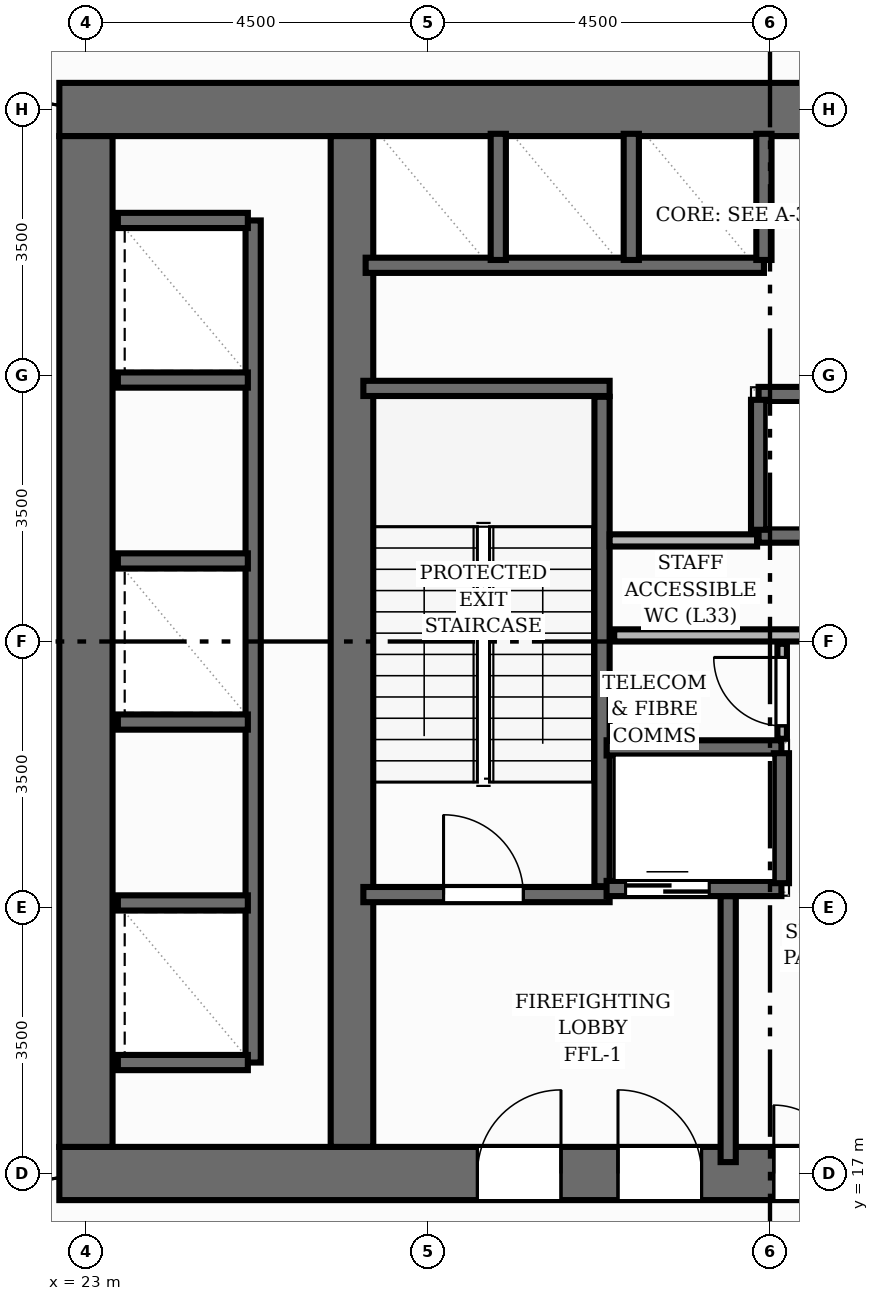
"""IFC4 building model, lengths in metres.
Left out: names, types, materials, properties, quantities, classifications, styles, units other than length and angle.
Written with IfcOpenShell. Run it as: python <this file> out.ifc"""

import sys

from ifc_helpers import new_model, si_unit, direction, frame, frame_2d, origin, place, context, subcontext, project, spatial, rectangle, extrude, element, fill, save


model = new_model("IFC4")
c1 = context("Model", 3, precision=1e-05, world=origin(), true_north=direction((0.0, 1.0)))
c2 = subcontext(c1, "Body", "Model", "MODEL_VIEW")
j1 = project(units=[si_unit("LENGTHUNIT", "METRE"), si_unit("PLANEANGLEUNIT", "RADIAN")], contexts=[c1])
p1 = place(None, origin())
s1 = spatial("IfcSite", under=j1, at=p1, CompositionType="ELEMENT")
p2 = place(p1, origin())
s2 = spatial("IfcBuilding", under=s1, at=p2, CompositionType="ELEMENT")
p3 = place(p2, frame((0.0, 0.0, 112.48)))
s3 = spatial("IfcBuildingStorey", under=s2, at=p3, CompositionType="ELEMENT", Elevation=112.48)
p4 = place(p3, frame((22.65, 17.0, 0.0), z_axis=(0.0, 0.0, 1.0), x_axis=(1.0, 0.0, 0.0)))
e1 = element("IfcWall", 1, at=p4, inside=s3, PredefinedType="SHEAR", context=c2, shape_type="SweptSolid", body=[
    extrude(rectangle(XDim=18.7, YDim=0.7, at=frame_2d((9.35, 0.0))), origin(), (0.0, 0.0, 1.0), 4.48),
])
p5 = place(p4, frame((5.5, 0.0, 0.0)))
e2 = element("IfcOpeningElement", 2, at=p5, cuts=e1, PredefinedType="OPENING", context=c2, shape_type="SweptSolid", body=[
    extrude(rectangle(XDim=1.1, YDim=2.15, at=frame_2d((0.55, 1.075))), frame((0.0, 0.36, 0.0), z_axis=(0.0, -1.0, 0.0), x_axis=(1.0, 0.0, 0.0)), (0.0, 0.0, 1.0), 0.72),
])
p6 = place(p4, frame((7.35, 0.0, 0.0)))
e3 = element("IfcOpeningElement", 3, at=p6, cuts=e1, PredefinedType="OPENING", context=c2, shape_type="SweptSolid", body=[
    extrude(rectangle(XDim=1.1, YDim=2.15, at=frame_2d((0.55, 1.075))), frame((0.0, 0.36, 0.0), z_axis=(0.0, -1.0, 0.0), x_axis=(1.0, 0.0, 0.0)), (0.0, 0.0, 1.0), 0.72),
])
p7 = place(p4, frame((9.4, 0.0, 0.0)))
e4 = element("IfcOpeningElement", 4, at=p7, cuts=e1, PredefinedType="OPENING", context=c2, shape_type="SweptSolid", body=[
    extrude(rectangle(XDim=0.9, YDim=2.1, at=frame_2d((0.45, 1.05))), frame((0.0, 0.36, 0.0), z_axis=(0.0, -1.0, 0.0), x_axis=(1.0, 0.0, 0.0)), (0.0, 0.0, 1.0), 0.72),
])
p8 = place(p3, frame((22.65, 31.0, 0.0), z_axis=(0.0, 0.0, 1.0), x_axis=(1.0, 0.0, 0.0)))
e5 = element("IfcWall", 5, at=p8, inside=s3, PredefinedType="SHEAR", context=c2, shape_type="SweptSolid", body=[
    extrude(rectangle(XDim=18.7, YDim=0.7, at=frame_2d((9.35, 0.0))), origin(), (0.0, 0.0, 1.0), 4.48),
])
p9 = place(p8, frame((10.25, 0.0, 0.0)))
e6 = element("IfcOpeningElement", 6, at=p9, cuts=e5, PredefinedType="OPENING", context=c2, shape_type="SweptSolid", body=[
    extrude(rectangle(XDim=1.1, YDim=2.15, at=frame_2d((0.55, 1.075))), frame((0.0, 0.36, 0.0), z_axis=(0.0, -1.0, 0.0), x_axis=(1.0, 0.0, 0.0)), (0.0, 0.0, 1.0), 0.72),
])
p10 = place(p8, frame((12.1, 0.0, 0.0)))
e7 = element("IfcOpeningElement", 7, at=p10, cuts=e5, PredefinedType="OPENING", context=c2, shape_type="SweptSolid", body=[
    extrude(rectangle(XDim=1.1, YDim=2.15, at=frame_2d((0.55, 1.075))), frame((0.0, 0.36, 0.0), z_axis=(0.0, -1.0, 0.0), x_axis=(1.0, 0.0, 0.0)), (0.0, 0.0, 1.0), 0.72),
])
p11 = place(p3, frame((23.0, 17.35, 0.0), z_axis=(0.0, 0.0, 1.0), x_axis=(0.0, 1.0, 0.0)))
e8 = element("IfcWall", 8, at=p11, inside=s3, PredefinedType="SHEAR", context=c2, shape_type="SweptSolid", body=[
    extrude(rectangle(XDim=13.3, YDim=0.7, at=frame_2d((6.65, 0.0))), origin(), (0.0, 0.0, 1.0), 4.48),
])
p12 = place(p3, frame((26.5, 17.35, 0.0), z_axis=(0.0, 0.0, 1.0), x_axis=(0.0, 1.0, 0.0)))
e9 = element("IfcWall", 9, at=p12, inside=s3, PredefinedType="SHEAR", context=c2, shape_type="SweptSolid", body=[
    extrude(rectangle(XDim=13.3, YDim=0.56, at=frame_2d((6.65, 0.0))), origin(), (0.0, 0.0, 1.0), 4.48),
])
p13 = place(p3, frame((29.79, 20.78, 0.0), z_axis=(0.0, 0.0, 1.0), x_axis=(0.0, 1.0, 0.0)))
e10 = element("IfcWall", 10, at=p13, inside=s3, PredefinedType="SHEAR", context=c2, shape_type="SweptSolid", body=[
    extrude(rectangle(XDim=6.44, YDim=0.2, at=frame_2d((3.22, 0.0))), origin(), (0.0, 0.0, 1.0), 4.48),
])
p14 = place(p3, frame((26.65, 27.33, 0.0), z_axis=(0.0, 0.0, 1.0), x_axis=(1.0, 0.0, 0.0)))
e11 = element("IfcWall", 11, at=p14, inside=s3, PredefinedType="SHEAR", context=c2, shape_type="SweptSolid", body=[
    extrude(rectangle(XDim=3.24, YDim=0.2, at=frame_2d((1.62, 0.0))), origin(), (0.0, 0.0, 1.0), 4.48),
])
p15 = place(p3, frame((26.65, 20.67, 0.0), z_axis=(0.0, 0.0, 1.0), x_axis=(1.0, 0.0, 0.0)))
e12 = element("IfcWall", 12, at=p15, inside=s3, PredefinedType="SHEAR", context=c2, shape_type="SweptSolid", body=[
    extrude(rectangle(XDim=3.24, YDim=0.2, at=frame_2d((1.62, 0.0))), origin(), (0.0, 0.0, 1.0), 4.48),
])
p16 = place(p15, frame((1.055, 0.0, 0.0)))
e13 = element("IfcOpeningElement", 13, at=p16, cuts=e12, PredefinedType="OPENING", context=c2, shape_type="SweptSolid", body=[
    extrude(rectangle(XDim=1.05, YDim=2.15, at=frame_2d((0.525, 1.075))), frame((0.0, 0.11, 0.0), z_axis=(0.0, -1.0, 0.0), x_axis=(1.0, 0.0, 0.0)), (0.0, 0.0, 1.0), 0.22),
])
p17 = place(p3, frame((31.45, 17.15, 0.0), z_axis=(0.0, 0.0, 1.0), x_axis=(0.0, 1.0, 0.0)))
e14 = element("IfcWall", 14, at=p17, inside=s3, PredefinedType="SHEAR", context=c2, shape_type="SweptSolid", body=[
    extrude(rectangle(XDim=3.5, YDim=0.2, at=frame_2d((1.75, 0.0))), origin(), (0.0, 0.0, 1.0), 4.48),
])
p18 = place(p3, frame((29.85, 20.75, 0.0), z_axis=(0.0, 0.0, 1.0), x_axis=(1.0, 0.0, 0.0)))
e15 = element("IfcWall", 15, at=p18, inside=s3, PredefinedType="SHEAR", context=c2, shape_type="SweptSolid", body=[
    extrude(rectangle(XDim=2.3, YDim=0.2, at=frame_2d((1.15, 0.0))), origin(), (0.0, 0.0, 1.0), 4.48),
])
p19 = place(p18, frame((0.25, 0.0, 0.0)))
e16 = element("IfcOpeningElement", 16, at=p19, cuts=e15, PredefinedType="OPENING", context=c2, shape_type="SweptSolid", body=[
    extrude(rectangle(XDim=1.1, YDim=2.15, at=frame_2d((0.55, 1.075))), frame((0.0, 0.11, 0.0), z_axis=(0.0, -1.0, 0.0), x_axis=(1.0, 0.0, 0.0)), (0.0, 0.0, 1.0), 0.22),
])
p20 = place(p3, frame((29.85, 22.6, 0.0), z_axis=(0.0, 0.0, 1.0), x_axis=(1.0, 0.0, 0.0)))
e17 = element("IfcWall", 17, at=p20, inside=s3, PredefinedType="SHEAR", context=c2, shape_type="SweptSolid", body=[
    extrude(rectangle(XDim=2.3, YDim=0.2, at=frame_2d((1.15, 0.0))), origin(), (0.0, 0.0, 1.0), 4.48),
])
p21 = place(p3, frame((32.15, 20.82, 0.0), z_axis=(0.0, 0.0, 1.0), x_axis=(0.0, 1.0, 0.0)))
e18 = element("IfcWall", 18, at=p21, inside=s3, PredefinedType="SHEAR", context=c2, shape_type="SweptSolid", body=[
    extrude(rectangle(XDim=1.71, YDim=0.2, at=frame_2d((0.855, 0.0))), origin(), (0.0, 0.0, 1.0), 4.48),
])
p22 = place(p3, frame((31.85, 27.25, 0.0), z_axis=(0.0, 0.0, 1.0), x_axis=(1.0, 0.0, 0.0)))
e19 = element("IfcWall", 19, at=p22, inside=s3, PredefinedType="SHEAR", context=c2, shape_type="SweptSolid", body=[
    extrude(rectangle(XDim=2.3, YDim=0.2, at=frame_2d((1.15, 0.0))), origin(), (0.0, 0.0, 1.0), 4.48),
])
p23 = place(p22, frame((0.95, 0.0, 0.0)))
e20 = element("IfcOpeningElement", 20, at=p23, cuts=e19, PredefinedType="OPENING", context=c2, shape_type="SweptSolid", body=[
    extrude(rectangle(XDim=1.1, YDim=2.15, at=frame_2d((0.55, 1.075))), frame((0.0, 0.11, 0.0), z_axis=(0.0, -1.0, 0.0), x_axis=(1.0, 0.0, 0.0)), (0.0, 0.0, 1.0), 0.22),
])
p24 = place(p3, frame((31.85, 25.4, 0.0), z_axis=(0.0, 0.0, 1.0), x_axis=(1.0, 0.0, 0.0)))
e21 = element("IfcWall", 21, at=p24, inside=s3, PredefinedType="SHEAR", context=c2, shape_type="SweptSolid", body=[
    extrude(rectangle(XDim=2.3, YDim=0.2, at=frame_2d((1.15, 0.0))), origin(), (0.0, 0.0, 1.0), 4.48),
])
p25 = place(p3, frame((31.85, 25.47, 0.0), z_axis=(0.0, 0.0, 1.0), x_axis=(0.0, 1.0, 0.0)))
e22 = element("IfcWall", 22, at=p25, inside=s3, PredefinedType="SHEAR", context=c2, shape_type="SweptSolid", body=[
    extrude(rectangle(XDim=1.71, YDim=0.2, at=frame_2d((0.855, 0.0))), origin(), (0.0, 0.0, 1.0), 4.48),
])
p26 = place(p3, frame((25.2, 18.46, 0.0), z_axis=(0.0, 0.0, 1.0), x_axis=(0.0, 1.0, 0.0)))
e23 = element("IfcWall", 23, at=p26, inside=s3, PredefinedType="SHEAR", context=c2, shape_type="SweptSolid", body=[
    extrude(rectangle(XDim=11.08, YDim=0.2, at=frame_2d((5.54, 0.0))), origin(), (0.0, 0.0, 1.0), 4.48),
])
for number, where, z_axis, x_axis in (
    (24, (23.42, 18.46, 0.0), (0.0, 0.0, 1.0), (1.0, 0.0, 0.0)),
    (25, (23.42, 29.54, 0.0), (0.0, 0.0, 1.0), (1.0, 0.0, 0.0)),
    (26, (23.42, 20.56, 0.0), (0.0, 0.0, 1.0), (1.0, 0.0, 0.0)),
    (27, (23.42, 22.94, 0.0), (0.0, 0.0, 1.0), (1.0, 0.0, 0.0)),
    (28, (23.42, 25.06, 0.0), (0.0, 0.0, 1.0), (1.0, 0.0, 0.0)),
    (29, (23.42, 27.44, 0.0), (0.0, 0.0, 1.0), (1.0, 0.0, 0.0)),
):
    element("IfcWall", number, at=place(p3, frame(where, z_axis=z_axis, x_axis=x_axis)), inside=s3, PredefinedType="SHEAR", context=c2, shape_type="SweptSolid", body=[
        extrude(rectangle(XDim=1.71, YDim=0.2, at=frame_2d((0.855, 0.0))), origin(), (0.0, 0.0, 1.0), 4.48),
    ])
p27 = place(p3, frame((26.68, 28.95, 0.0), z_axis=(0.0, 0.0, 1.0), x_axis=(1.0, 0.0, 0.0)))
e30 = element("IfcWall", 30, at=p27, inside=s3, PredefinedType="SHEAR", context=c2, shape_type="SweptSolid", body=[
    extrude(rectangle(XDim=5.24, YDim=0.2, at=frame_2d((2.62, 0.0))), origin(), (0.0, 0.0, 1.0), 4.48),
])
for number, where, z_axis, x_axis in (
    (31, (31.92, 29.02, 0.0), (0.0, 0.0, 1.0), (0.0, 1.0, 0.0)),
    (32, (28.425, 29.02, 0.0), (0.0, 0.0, 1.0), (0.0, 1.0, 0.0)),
    (33, (30.175, 29.02, 0.0), (0.0, 0.0, 1.0), (0.0, 1.0, 0.0)),
):
    element("IfcWall", number, at=place(p3, frame(where, z_axis=z_axis, x_axis=x_axis)), inside=s3, PredefinedType="SHEAR", context=c2, shape_type="SweptSolid", body=[
        extrude(rectangle(XDim=1.66, YDim=0.2, at=frame_2d((0.83, 0.0))), origin(), (0.0, 0.0, 1.0), 4.48),
    ])
p28 = place(p3, frame((29.95, 24.08, 0.0), z_axis=(0.0, 0.0, 1.0), x_axis=(1.0, 0.0, 0.0)))
e34 = element("IfcWall", 34, at=p28, inside=s3, PredefinedType="PLUMBINGWALL", context=c2, shape_type="SweptSolid", body=[
    extrude(rectangle(XDim=4.13, YDim=0.16, at=frame_2d((2.065, 0.0))), origin(), (0.0, 0.0, 1.0), 4.235),
])
p29 = place(p28, frame((2.55, 0.0, 0.0)))
e35 = element("IfcOpeningElement", 35, at=p29, cuts=e34, PredefinedType="OPENING", context=c2, shape_type="SweptSolid", body=[
    extrude(rectangle(XDim=0.9, YDim=2.1, at=frame_2d((0.45, 1.05))), frame((0.0, 0.09, 0.0), z_axis=(0.0, -1.0, 0.0), x_axis=(1.0, 0.0, 0.0)), (0.0, 0.0, 1.0), 0.18),
])
p30 = place(p3, frame((32.16, 22.72, 0.0), z_axis=(0.0, 0.0, 1.0), x_axis=(0.0, 1.0, 0.0)))
e36 = element("IfcWall", 36, at=p30, inside=s3, PredefinedType="PARTITIONING", context=c2, shape_type="SweptSolid", body=[
    extrude(rectangle(XDim=1.25, YDim=0.125, at=frame_2d((0.625, 0.0))), origin(), (0.0, 0.0, 1.0), 4.235),
])
p31 = place(p30, frame((0.17, 0.0, 0.0)))
e37 = element("IfcOpeningElement", 37, at=p31, cuts=e36, PredefinedType="OPENING", context=c2, shape_type="SweptSolid", body=[
    extrude(rectangle(XDim=0.9, YDim=2.1, at=frame_2d((0.45, 1.05))), frame((0.0, 0.073, 0.0), z_axis=(0.0, -1.0, 0.0), x_axis=(1.0, 0.0, 0.0)), (0.0, 0.0, 1.0), 0.145),
])
p32 = place(p3, frame((29.89, 25.33, 0.0), z_axis=(0.0, 0.0, 1.0), x_axis=(1.0, 0.0, 0.0)))
e38 = element("IfcWall", 38, at=p32, inside=s3, PredefinedType="PLUMBINGWALL", context=c2, shape_type="SweptSolid", body=[
    extrude(rectangle(XDim=1.94, YDim=0.16, at=frame_2d((0.97, 0.0))), origin(), (0.0, 0.0, 1.0), 4.235),
])
p33 = place(p16, origin())
e39 = element("IfcDoor", 39, at=p33, inside=s3, OperationType="SINGLE_SWING_LEFT", PredefinedType="DOOR", context=c2, shape_type="SweptSolid", body=[
    extrude(rectangle(XDim=1.05, YDim=2.15, at=frame_2d((0.525, 1.075))), frame((0.0, 0.025, 0.0), z_axis=(0.0, -1.0, 0.0), x_axis=(1.0, 0.0, 0.0)), (0.0, 0.0, 1.0), 0.05),
])
fill(e13, e39)
p34 = place(p5, origin())
e40 = element("IfcDoor", 40, at=p34, inside=s3, OperationType="SINGLE_SWING_RIGHT", PredefinedType="DOOR", context=c2, shape_type="SweptSolid", body=[
    extrude(rectangle(XDim=1.1, YDim=2.15, at=frame_2d((0.55, 1.075))), frame((0.0, 0.025, 0.0), z_axis=(0.0, -1.0, 0.0), x_axis=(1.0, 0.0, 0.0)), (0.0, 0.0, 1.0), 0.05),
])
fill(e2, e40)
p35 = place(p6, origin())
e41 = element("IfcDoor", 41, at=p35, inside=s3, OperationType="SINGLE_SWING_LEFT", PredefinedType="DOOR", context=c2, shape_type="SweptSolid", body=[
    extrude(rectangle(XDim=1.1, YDim=2.15, at=frame_2d((0.55, 1.075))), frame((0.0, 0.025, 0.0), z_axis=(0.0, -1.0, 0.0), x_axis=(1.0, 0.0, 0.0)), (0.0, 0.0, 1.0), 0.05),
])
fill(e3, e41)
p36 = place(p19, origin())
e42 = element("IfcDoor", 42, at=p36, inside=s3, OperationType="DOUBLE_DOOR_SLIDING", PredefinedType="DOOR", context=c2, shape_type="SweptSolid", body=[
    extrude(rectangle(XDim=1.1, YDim=2.15, at=frame_2d((0.55, 1.075))), frame((0.0, 0.025, 0.0), z_axis=(0.0, -1.0, 0.0), x_axis=(1.0, 0.0, 0.0)), (0.0, 0.0, 1.0), 0.05),
])
fill(e16, e42)
p37 = place(p7, origin())
e43 = element("IfcDoor", 43, at=p37, inside=s3, OperationType="SINGLE_SWING_LEFT", PredefinedType="DOOR", context=c2, shape_type="SweptSolid", body=[
    extrude(rectangle(XDim=0.9, YDim=2.1, at=frame_2d((0.45, 1.05))), frame((0.0, 0.025, 0.0), z_axis=(0.0, -1.0, 0.0), x_axis=(1.0, 0.0, 0.0)), (0.0, 0.0, 1.0), 0.05),
])
fill(e4, e43)
p38 = place(p31, origin())
e44 = element("IfcDoor", 44, at=p38, inside=s3, OperationType="SINGLE_SWING_RIGHT", PredefinedType="DOOR", context=c2, shape_type="SweptSolid", body=[
    extrude(rectangle(XDim=0.9, YDim=2.1, at=frame_2d((0.45, 1.05))), frame((0.0, 0.025, 0.0), z_axis=(0.0, -1.0, 0.0), x_axis=(1.0, 0.0, 0.0)), (0.0, 0.0, 1.0), 0.05),
])
fill(e37, e44)
save(model, sys.argv[1])
